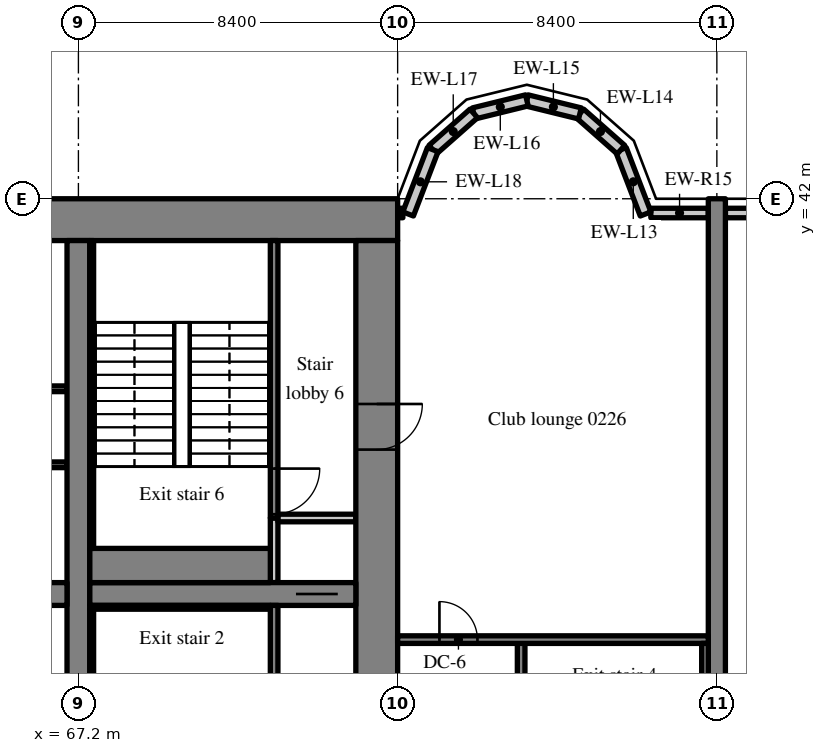
"""IFC4 building model, lengths in metres.
Left out: names, types, materials, properties, quantities, classifications, styles, units other than length and angle.
Written with IfcOpenShell. Run it as: python <this file> out.ifc"""

import sys

from ifc_helpers import new_model, si_unit, direction, frame, frame_2d, origin, place, context, subcontext, project, spatial, rectangle, extrude, source, transform, mapped, element, fill, save


model = new_model("IFC4")
c1 = context("Model", 3, precision=1e-05, world=origin(), true_north=direction((0.0, 1.0)))
c2 = subcontext(c1, "Body", "Model", "MODEL_VIEW")
j1 = project(units=[si_unit("LENGTHUNIT", "METRE"), si_unit("PLANEANGLEUNIT", "RADIAN")], contexts=[c1])
p1 = place(None, origin())
s1 = spatial("IfcSite", under=j1, at=p1, CompositionType="ELEMENT")
p2 = place(p1, origin())
s2 = spatial("IfcBuilding", under=s1, at=p2, CompositionType="ELEMENT")
p3 = place(p2, frame((0.0, 0.0, 11.4)))
s3 = spatial("IfcBuildingStorey", under=s2, at=p3, CompositionType="ELEMENT", Elevation=11.4)
m1 = source(origin(), c2, "Body", "SweptSolid", [
    extrude(rectangle(XDim=50.4, YDim=1.1, at=frame_2d((25.2, 0.0))), origin(), (0.0, 0.0, 1.0), 6.32),
])
p4 = place(p3, frame((25.2, 41.45, 0.0), z_axis=(0.0, 0.0, 1.0), x_axis=(1.0, 0.0, 0.0)))
e1 = element("IfcWall", 1, at=p4, inside=s3, PredefinedType="SHEAR", context=c2, shape_type="MappedRepresentation", body=[
    mapped(m1, transform((0.0, 0.0, 0.0), scale=1.0)),
])
m2 = source(origin(), c2, "Body", "SweptSolid", [
    extrude(rectangle(XDim=17.8, YDim=1.1, at=frame_2d((8.9, 0.0))), origin(), (0.0, 0.0, 1.0), 6.32),
])
p5 = place(p3, frame((75.05, 23.1, 0.0), z_axis=(0.0, 0.0, 1.0), x_axis=(0.0, 1.0, 0.0)))
e2 = element("IfcWall", 2, at=p5, inside=s3, PredefinedType="SHEAR", context=c2, shape_type="MappedRepresentation", body=[
    mapped(m2, transform((0.0, 0.0, 0.0), scale=1.0)),
])
m3 = source(origin(), c2, "Body", "SweptSolid", [
    extrude(rectangle(XDim=1.2, YDim=2.1, at=frame_2d((0.6, 1.05))), frame((0.0, 0.56, 0.0), z_axis=(0.0, -1.0, 0.0), x_axis=(1.0, 0.0, 0.0)), (0.0, 0.0, 1.0), 1.12),
])
p6 = place(p5, frame((12.3, 0.0, 0.0)))
e3 = element("IfcOpeningElement", 3, at=p6, cuts=e2, PredefinedType="OPENING", context=c2, shape_type="MappedRepresentation", body=[
    mapped(m3, transform((0.0, 0.0, 0.0), scale=1.0)),
])
m4 = source(origin(), c2, "Body", "SweptSolid", [
    extrude(rectangle(XDim=17.8, YDim=0.6, at=frame_2d((8.9, 0.0))), origin(), (0.0, 0.0, 1.0), 6.32),
])
p7 = place(p3, frame((67.2, 23.1, 0.0), z_axis=(0.0, 0.0, 1.0), x_axis=(0.0, 1.0, 0.0)))
e4 = element("IfcWall", 4, at=p7, inside=s3, PredefinedType="SHEAR", context=c2, shape_type="MappedRepresentation", body=[
    mapped(m4, transform((0.0, 0.0, 0.0), scale=1.0)),
])
m5 = source(origin(), c2, "Body", "SweptSolid", [
    extrude(rectangle(XDim=16.2, YDim=0.6, at=frame_2d((8.1, 0.0))), origin(), (0.0, 0.0, 1.0), 6.32),
])
p8 = place(p3, frame((50.7, 31.6, 0.0), z_axis=(0.0, 0.0, 1.0), x_axis=(1.0, 0.0, 0.0)))
e5 = element("IfcWall", 5, at=p8, inside=s3, PredefinedType="SHEAR", context=c2, shape_type="MappedRepresentation", body=[
    mapped(m5, transform((0.0, 0.0, 0.0), scale=1.0)),
])
m6 = source(origin(), c2, "Body", "SweptSolid", [
    extrude(rectangle(XDim=1.0, YDim=2.1, at=frame_2d((0.5, 1.05))), frame((0.0, 0.31, 0.0), z_axis=(0.0, -1.0, 0.0), x_axis=(1.0, 0.0, 0.0)), (0.0, 0.0, 1.0), 0.62),
])
p9 = place(p8, frame((0.55, 0.0, 0.0)))
e6 = element("IfcOpeningElement", 6, at=p9, cuts=e5, PredefinedType="OPENING", context=c2, shape_type="MappedRepresentation", body=[
    mapped(m6, transform((0.0, 0.0, 0.0), scale=1.0)),
])
m7 = source(origin(), c2, "Body", "SweptSolid", [
    extrude(rectangle(XDim=7.0, YDim=0.6, at=frame_2d((3.5, 0.0))), origin(), (0.0, 0.0, 1.0), 6.32),
])
p10 = place(p3, frame((67.5, 31.6, 0.0), z_axis=(0.0, 0.0, 1.0), x_axis=(1.0, 0.0, 0.0)))
e7 = element("IfcWall", 7, at=p10, inside=s3, PredefinedType="SHEAR", context=c2, shape_type="MappedRepresentation", body=[
    mapped(m7, transform((0.0, 0.0, 0.0), scale=1.0)),
])
m8 = source(origin(), c2, "Body", "SweptSolid", [
    extrude(rectangle(XDim=1.1, YDim=2.1, at=frame_2d((0.55, 1.05))), frame((0.0, 0.31, 0.0), z_axis=(0.0, -1.0, 0.0), x_axis=(1.0, 0.0, 0.0)), (0.0, 0.0, 1.0), 0.62),
])
p11 = place(p10, frame((5.425, 0.0, 0.0)))
e8 = element("IfcOpeningElement", 8, at=p11, cuts=e7, PredefinedType="OPENING", context=c2, shape_type="MappedRepresentation", body=[
    mapped(m8, transform((0.0, 0.0, 0.0), scale=1.0)),
])
m9 = source(origin(), c2, "Body", "SweptSolid", [
    extrude(rectangle(XDim=20.0, YDim=0.45, at=frame_2d((10.0, 0.0))), origin(), (0.0, 0.0, 1.0), 6.32),
])
p12 = place(p3, frame((84.0, 22.0, 0.0), z_axis=(0.0, 0.0, 1.0), x_axis=(0.0, 1.0, 0.0)))
e9 = element("IfcWall", 9, at=p12, inside=s3, PredefinedType="SHEAR", context=c2, shape_type="MappedRepresentation", body=[
    mapped(m9, transform((0.0, 0.0, 0.0), scale=1.0)),
])
m10 = source(origin(), c2, "Body", "SweptSolid", [
    extrude(rectangle(XDim=3.525, YDim=0.25, at=frame_2d((1.762, 0.0))), origin(), (0.0, 0.0, 1.0), 5.57),
])
p13 = place(p3, frame((87.75, 41.625, 0.0), z_axis=(0.0, 0.0, 1.0), x_axis=(-1.0, 0.0, 0.0)))
e10 = element("IfcWall", 10, at=p13, inside=s3, PredefinedType="SOLIDWALL", context=c2, shape_type="MappedRepresentation", body=[
    mapped(m10, transform((0.0, 0.0, 0.0), scale=1.0)),
])
m11 = source(origin(), c2, "Body", "SweptSolid", [
    extrude(rectangle(XDim=1.5, YDim=1.5, at=frame_2d((0.75, 0.75))), frame((0.0, 0.135, 0.0), z_axis=(0.0, -1.0, 0.0), x_axis=(1.0, 0.0, 0.0)), (0.0, 0.0, 1.0), 0.27),
])
p14 = place(p13, frame((1.012, 0.0, 0.9)))
e11 = element("IfcOpeningElement", 11, at=p14, cuts=e10, PredefinedType="OPENING", context=c2, shape_type="MappedRepresentation", body=[
    mapped(m11, transform((0.0, 0.0, 0.0), scale=1.0)),
])
m12 = source(origin(), c2, "Body", "SweptSolid", [
    extrude(rectangle(XDim=1.513, YDim=0.25, at=frame_2d((0.756, 0.0))), origin(), (0.0, 0.0, 1.0), 5.57),
])
p15 = place(p3, frame((83.775, 41.625, 0.0), z_axis=(0.0, 0.0, 1.0), x_axis=(-1.0, 0.0, 0.0)))
e12 = element("IfcWall", 12, at=p15, inside=s3, PredefinedType="SOLIDWALL", context=c2, shape_type="MappedRepresentation", body=[
    mapped(m12, transform((0.0, 0.0, 0.0), scale=1.0)),
])
m13 = source(origin(), c2, "Body", "SweptSolid", [
    extrude(rectangle(XDim=1.812, YDim=0.3, at=frame_2d((0.906, 0.0))), origin(), (0.0, 0.0, 1.0), 6.32),
])
p16 = place(p3, frame((82.125, 41.6, 0.0), z_axis=(0.0, 0.0, 1.0), x_axis=(-0.357877270961, 0.93376863244, 0.0)))
e13 = element("IfcWall", 13, at=p16, inside=s3, PredefinedType="SOLIDWALL", context=c2, shape_type="MappedRepresentation", body=[
    mapped(m13, transform((0.0, 0.0, 0.0), scale=1.0)),
])
m14 = source(origin(), c2, "Body", "SweptSolid", [
    extrude(rectangle(XDim=1.44, YDim=0.3, at=frame_2d((0.72, 0.0))), origin(), (0.0, 0.0, 1.0), 6.32),
])
p17 = place(p3, frame((81.477, 43.292, 0.0), z_axis=(0.0, 0.0, 1.0), x_axis=(-0.74957555648, 0.661918790432, 0.0)))
e14 = element("IfcWall", 14, at=p17, inside=s3, PredefinedType="SOLIDWALL", context=c2, shape_type="MappedRepresentation", body=[
    mapped(m14, transform((0.0, 0.0, 0.0), scale=1.0)),
])
m15 = source(origin(), c2, "Body", "SweptSolid", [
    extrude(rectangle(XDim=1.439, YDim=0.3, at=frame_2d((0.719, 0.0))), origin(), (0.0, 0.0, 1.0), 6.32),
])
for number, where, z_axis, x_axis in (
    (15, (80.397, 44.245, 0.0), (0.0, 0.0, 1.0), (-0.971, 0.238, 0.0)),
    (16, (79.0, 44.588, 0.0), (0.0, 0.0, 1.0), (-0.971, -0.238, 0.0)),
):
    element("IfcWall", number, at=place(p3, frame(where, z_axis=z_axis, x_axis=x_axis)), inside=s3, PredefinedType="SOLIDWALL", context=c2, shape_type="MappedRepresentation", body=[
        mapped(m15, transform((0.0, 0.0, 0.0), scale=1.0)),
    ])
p18 = place(p3, frame((77.603, 44.245, 0.0), z_axis=(0.0, 0.0, 1.0), x_axis=(-0.74957555648, -0.661918790432, 0.0)))
e17 = element("IfcWall", 17, at=p18, inside=s3, PredefinedType="SOLIDWALL", context=c2, shape_type="MappedRepresentation", body=[
    mapped(m14, transform((0.0, 0.0, 0.0), scale=1.0)),
])
p19 = place(p3, frame((76.523, 43.292, 0.0), z_axis=(0.0, 0.0, 1.0), x_axis=(-0.357877270961, -0.93376863244, 0.0)))
e18 = element("IfcWall", 18, at=p19, inside=s3, PredefinedType="SOLIDWALL", context=c2, shape_type="MappedRepresentation", body=[
    mapped(m13, transform((0.0, 0.0, 0.0), scale=1.0)),
])
m16 = source(origin(), c2, "Body", "SweptSolid", [
    extrude(rectangle(XDim=0.138, YDim=0.25, at=frame_2d((0.069, 0.0))), origin(), (0.0, 0.0, 1.0), 5.57),
])
p20 = place(p3, frame((75.738, 41.625, 0.0), z_axis=(0.0, 0.0, 1.0), x_axis=(-1.0, 0.0, 0.0)))
e19 = element("IfcWall", 19, at=p20, inside=s3, PredefinedType="SOLIDWALL", context=c2, shape_type="MappedRepresentation", body=[
    mapped(m16, transform((0.0, 0.0, 0.0), scale=1.0)),
])
m17 = source(origin(), c2, "Body", "SweptSolid", [
    extrude(rectangle(XDim=14.1, YDim=0.15, at=frame_2d((7.05, 0.0))), origin(), (0.0, 0.0, 1.0), 6.32),
])
p21 = place(p3, frame((66.9, 35.0, 0.0), z_axis=(0.0, 0.0, 1.0), x_axis=(-1.0, 0.0, 0.0)))
e20 = element("IfcWall", 20, at=p21, inside=s3, PredefinedType="PARTITIONING", context=c2, shape_type="MappedRepresentation", body=[
    mapped(m17, transform((0.0, 0.0, 0.0), scale=1.0)),
])
m18 = source(origin(), c2, "Body", "SweptSolid", [
    extrude(rectangle(XDim=0.9, YDim=2.1, at=frame_2d((0.45, 1.05))), frame((0.0, 0.085, 0.0), z_axis=(0.0, -1.0, 0.0), x_axis=(1.0, 0.0, 0.0)), (0.0, 0.0, 1.0), 0.17),
])
p22 = place(p21, frame((0.952, 0.0, 0.0)))
e21 = element("IfcOpeningElement", 21, at=p22, cuts=e20, PredefinedType="OPENING", context=c2, shape_type="MappedRepresentation", body=[
    mapped(m18, transform((0.0, 0.0, 0.0), scale=1.0)),
])
p23 = place(p21, frame((5.861, 0.0, 0.0)))
e22 = element("IfcOpeningElement", 22, at=p23, cuts=e20, PredefinedType="OPENING", context=c2, shape_type="MappedRepresentation", body=[
    mapped(m18, transform((0.0, 0.0, 0.0), scale=1.0)),
])
p24 = place(p21, frame((11.471, 0.0, 0.0)))
e23 = element("IfcOpeningElement", 23, at=p24, cuts=e20, PredefinedType="OPENING", context=c2, shape_type="MappedRepresentation", body=[
    mapped(m18, transform((0.0, 0.0, 0.0), scale=1.0)),
])
m19 = source(origin(), c2, "Body", "SweptSolid", [
    extrude(rectangle(XDim=16.2, YDim=0.15, at=frame_2d((8.1, 0.0))), origin(), (0.0, 0.0, 1.0), 6.32),
])
p25 = place(p3, frame((66.9, 37.0, 0.0), z_axis=(0.0, 0.0, 1.0), x_axis=(-1.0, 0.0, 0.0)))
e24 = element("IfcWall", 24, at=p25, inside=s3, PredefinedType="PARTITIONING", context=c2, shape_type="MappedRepresentation", body=[
    mapped(m19, transform((0.0, 0.0, 0.0), scale=1.0)),
])
p26 = place(p25, frame((0.765, 0.0, 0.0)))
e25 = element("IfcOpeningElement", 25, at=p26, cuts=e24, PredefinedType="OPENING", context=c2, shape_type="MappedRepresentation", body=[
    mapped(m18, transform((0.0, 0.0, 0.0), scale=1.0)),
])
p27 = place(p25, frame((3.6, 0.0, 0.0)))
e26 = element("IfcOpeningElement", 26, at=p27, cuts=e24, PredefinedType="OPENING", context=c2, shape_type="MappedRepresentation", body=[
    mapped(m18, transform((0.0, 0.0, 0.0), scale=1.0)),
])
p28 = place(p25, frame((9.27, 0.0, 0.0)))
e27 = element("IfcOpeningElement", 27, at=p28, cuts=e24, PredefinedType="OPENING", context=c2, shape_type="MappedRepresentation", body=[
    mapped(m18, transform((0.0, 0.0, 0.0), scale=1.0)),
])
p29 = place(p25, frame((14.535, 0.0, 0.0)))
e28 = element("IfcOpeningElement", 28, at=p29, cuts=e24, PredefinedType="OPENING", context=c2, shape_type="MappedRepresentation", body=[
    mapped(m18, transform((0.0, 0.0, 0.0), scale=1.0)),
])
m20 = source(origin(), c2, "Body", "SweptSolid", [
    extrude(rectangle(XDim=8.2, YDim=0.2, at=frame_2d((4.1, 0.0))), origin(), (0.0, 0.0, 1.0), 6.32),
])
p30 = place(p3, frame((72.35, 23.1, 0.0), z_axis=(0.0, 0.0, 1.0), x_axis=(0.0, 1.0, 0.0)))
e29 = element("IfcWall", 29, at=p30, inside=s3, PredefinedType="SOLIDWALL", context=c2, shape_type="MappedRepresentation", body=[
    mapped(m20, transform((0.0, 0.0, 0.0), scale=1.0)),
])
m21 = source(origin(), c2, "Body", "SweptSolid", [
    extrude(rectangle(XDim=1.2, YDim=2.1, at=frame_2d((0.6, 1.05))), frame((0.0, 0.11, 0.0), z_axis=(0.0, -1.0, 0.0), x_axis=(1.0, 0.0, 0.0)), (0.0, 0.0, 1.0), 0.22),
])
p31 = place(p30, frame((0.5, 0.0, 0.0)))
e30 = element("IfcOpeningElement", 30, at=p31, cuts=e29, PredefinedType="OPENING", context=c2, shape_type="MappedRepresentation", body=[
    mapped(m21, transform((0.0, 0.0, 0.0), scale=1.0)),
])
m22 = source(origin(), c2, "Body", "SweptSolid", [
    extrude(rectangle(XDim=1.7, YDim=0.2, at=frame_2d((0.85, 0.0))), origin(), (0.0, 0.0, 1.0), 6.32),
])
p32 = place(p3, frame((72.35, 31.9, 0.0), z_axis=(0.0, 0.0, 1.0), x_axis=(0.0, 1.0, 0.0)))
e31 = element("IfcWall", 31, at=p32, inside=s3, PredefinedType="SOLIDWALL", context=c2, shape_type="MappedRepresentation", body=[
    mapped(m22, transform((0.0, 0.0, 0.0), scale=1.0)),
])
m23 = source(origin(), c2, "Body", "SweptSolid", [
    extrude(rectangle(XDim=2.05, YDim=0.2, at=frame_2d((1.025, 0.0))), origin(), (0.0, 0.0, 1.0), 6.32),
])
p33 = place(p3, frame((72.45, 33.6, 0.0), z_axis=(0.0, 0.0, 1.0), x_axis=(1.0, 0.0, 0.0)))
e32 = element("IfcWall", 32, at=p33, inside=s3, PredefinedType="SOLIDWALL", context=c2, shape_type="MappedRepresentation", body=[
    mapped(m23, transform((0.0, 0.0, 0.0), scale=1.0)),
])
m24 = source(origin(), c2, "Body", "SweptSolid", [
    extrude(rectangle(XDim=7.3, YDim=0.2, at=frame_2d((3.65, 0.0))), origin(), (0.0, 0.0, 1.0), 6.32),
])
p34 = place(p3, frame((72.35, 33.6, 0.0), z_axis=(0.0, 0.0, 1.0), x_axis=(0.0, 1.0, 0.0)))
e33 = element("IfcWall", 33, at=p34, inside=s3, PredefinedType="SOLIDWALL", context=c2, shape_type="MappedRepresentation", body=[
    mapped(m24, transform((0.0, 0.0, 0.0), scale=1.0)),
])
p35 = place(p34, frame((0.1, 0.0, 0.0)))
e34 = element("IfcOpeningElement", 34, at=p35, cuts=e33, PredefinedType="OPENING", context=c2, shape_type="MappedRepresentation", body=[
    mapped(m21, transform((0.0, 0.0, 0.0), scale=1.0)),
])
m25 = source(origin(), c2, "Body", "SweptSolid", [
    extrude(rectangle(XDim=8.3, YDim=0.2, at=frame_2d((4.15, 0.0))), origin(), (0.0, 0.0, 1.0), 6.32),
])
p36 = place(p3, frame((78.85, 22.1, 0.0), z_axis=(0.0, 0.0, 1.0), x_axis=(0.0, 1.0, 0.0)))
e35 = element("IfcWall", 35, at=p36, inside=s3, PredefinedType="SOLIDWALL", context=c2, shape_type="MappedRepresentation", body=[
    mapped(m25, transform((0.0, 0.0, 0.0), scale=1.0)),
])
p37 = place(p36, frame((0.6, 0.0, 0.0)))
e36 = element("IfcOpeningElement", 36, at=p37, cuts=e35, PredefinedType="OPENING", context=c2, shape_type="MappedRepresentation", body=[
    mapped(m21, transform((0.0, 0.0, 0.0), scale=1.0)),
])
m26 = source(origin(), c2, "Body", "SweptSolid", [
    extrude(rectangle(XDim=8.175, YDim=0.2, at=frame_2d((4.087, 0.0))), origin(), (0.0, 0.0, 1.0), 6.32),
])
p38 = place(p3, frame((83.775, 30.4, 0.0), z_axis=(0.0, 0.0, 1.0), x_axis=(-1.0, 0.0, 0.0)))
e37 = element("IfcWall", 37, at=p38, inside=s3, PredefinedType="SOLIDWALL", context=c2, shape_type="MappedRepresentation", body=[
    mapped(m26, transform((0.0, 0.0, 0.0), scale=1.0)),
])
m27 = source(origin(), c2, "Body", "SweptSolid", [
    extrude(rectangle(XDim=1.0, YDim=2.1, at=frame_2d((0.5, 1.05))), frame((0.0, 0.11, 0.0), z_axis=(0.0, -1.0, 0.0), x_axis=(1.0, 0.0, 0.0)), (0.0, 0.0, 1.0), 0.22),
])
p39 = place(p38, frame((6.075, 0.0, 0.0)))
e38 = element("IfcOpeningElement", 38, at=p39, cuts=e37, PredefinedType="OPENING", context=c2, shape_type="MappedRepresentation", body=[
    mapped(m27, transform((0.0, 0.0, 0.0), scale=1.0)),
])
m28 = source(origin(), c2, "Body", "SweptSolid", [
    extrude(rectangle(XDim=4.75, YDim=0.1, at=frame_2d((2.375, 0.0))), origin(), (0.0, 0.0, 1.0), 6.32),
])
p40 = place(p3, frame((67.5, 31.25, 0.0), z_axis=(0.0, 0.0, 1.0), x_axis=(1.0, 0.0, 0.0)))
e39 = element("IfcWall", 39, at=p40, inside=s3, PredefinedType="SOLIDWALL", context=c2, shape_type="MappedRepresentation", body=[
    mapped(m28, transform((0.0, 0.0, 0.0), scale=1.0)),
])
m29 = source(origin(), c2, "Body", "SweptSolid", [
    extrude(rectangle(XDim=8.1, YDim=0.1, at=frame_2d((4.05, 0.0))), origin(), (0.0, 0.0, 1.0), 6.32),
])
p41 = place(p3, frame((67.55, 23.1, 0.0), z_axis=(0.0, 0.0, 1.0), x_axis=(0.0, 1.0, 0.0)))
e40 = element("IfcWall", 40, at=p41, inside=s3, PredefinedType="SOLIDWALL", context=c2, shape_type="MappedRepresentation", body=[
    mapped(m29, transform((0.0, 0.0, 0.0), scale=1.0)),
])
m30 = source(origin(), c2, "Body", "SweptSolid", [
    extrude(rectangle(XDim=4.75, YDim=0.9, at=frame_2d((2.375, 0.0))), origin(), (0.0, 0.0, 1.0), 6.32),
])
p42 = place(p3, frame((67.5, 32.35, 0.0), z_axis=(0.0, 0.0, 1.0), x_axis=(1.0, 0.0, 0.0)))
e41 = element("IfcWall", 41, at=p42, inside=s3, PredefinedType="SOLIDWALL", context=c2, shape_type="MappedRepresentation", body=[
    mapped(m30, transform((0.0, 0.0, 0.0), scale=1.0)),
])
p43 = place(p3, frame((67.55, 32.8, 0.0), z_axis=(0.0, 0.0, 1.0), x_axis=(0.0, 1.0, 0.0)))
e42 = element("IfcWall", 42, at=p43, inside=s3, PredefinedType="SOLIDWALL", context=c2, shape_type="MappedRepresentation", body=[
    mapped(m29, transform((0.0, 0.0, 0.0), scale=1.0)),
])
m31 = source(origin(), c2, "Body", "SweptSolid", [
    extrude(rectangle(XDim=8.1, YDim=0.175, at=frame_2d((4.05, 0.0))), origin(), (0.0, 0.0, 1.0), 6.32),
])
p44 = place(p3, frame((83.688, 22.2, 0.0), z_axis=(0.0, 0.0, 1.0), x_axis=(0.0, 1.0, 0.0)))
e43 = element("IfcWall", 43, at=p44, inside=s3, PredefinedType="SOLIDWALL", context=c2, shape_type="MappedRepresentation", body=[
    mapped(m31, transform((0.0, 0.0, 0.0), scale=1.0)),
])
m32 = source(origin(), c2, "Body", "SweptSolid", [
    extrude(rectangle(XDim=1.1, YDim=2.1, at=frame_2d((0.55, 1.05))), frame((0.0, 0.025, 0.0), z_axis=(0.0, -1.0, 0.0), x_axis=(1.0, 0.0, 0.0)), (0.0, 0.0, 1.0), 0.05),
])
p45 = place(p11, origin())
e44 = element("IfcDoor", 44, at=p45, inside=s3, OperationType="SLIDING_TO_RIGHT", PredefinedType="DOOR", context=c2, shape_type="MappedRepresentation", body=[
    mapped(m32, transform((0.0, 0.0, 0.0), scale=1.0)),
])
fill(e8, e44)
m33 = source(origin(), c2, "Body", "SweptSolid", [
    extrude(rectangle(XDim=1.2, YDim=2.1, at=frame_2d((0.6, 1.05))), frame((0.0, 0.025, 0.0), z_axis=(0.0, -1.0, 0.0), x_axis=(1.0, 0.0, 0.0)), (0.0, 0.0, 1.0), 0.05),
])
p46 = place(p35, origin())
e45 = element("IfcDoor", 45, at=p46, inside=s3, OperationType="SINGLE_SWING_RIGHT", PredefinedType="DOOR", context=c2, shape_type="MappedRepresentation", body=[
    mapped(m33, transform((0.0, 0.0, 0.0), scale=1.0)),
])
fill(e34, e45)
p47 = place(p6, origin())
e46 = element("IfcDoor", 46, at=p47, inside=s3, OperationType="SINGLE_SWING_RIGHT", PredefinedType="DOOR", context=c2, shape_type="MappedRepresentation", body=[
    mapped(m33, transform((0.0, 0.0, 0.0), scale=1.0)),
])
fill(e3, e46)
m34 = source(origin(), c2, "Body", "SweptSolid", [
    extrude(rectangle(XDim=1.0, YDim=2.1, at=frame_2d((0.5, 1.05))), frame((0.0, 0.025, 0.0), z_axis=(0.0, -1.0, 0.0), x_axis=(1.0, 0.0, 0.0)), (0.0, 0.0, 1.0), 0.05),
])
p48 = place(p39, origin())
e47 = element("IfcDoor", 47, at=p48, inside=s3, OperationType="SINGLE_SWING_RIGHT", PredefinedType="DOOR", context=c2, shape_type="MappedRepresentation", body=[
    mapped(m34, transform((0.0, 0.0, 0.0), scale=1.0)),
])
fill(e38, e47)
save(model, sys.argv[1])
